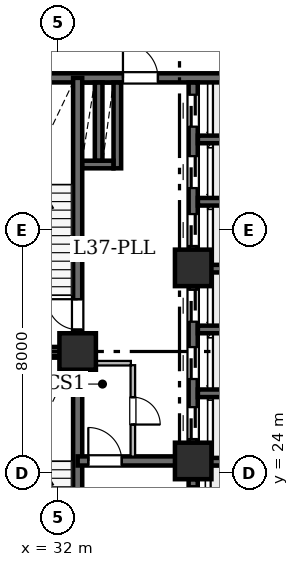
"""IFC4 building model, lengths in metres.
Left out: names, types, materials, properties, quantities, classifications, styles, units other than length and angle.
Written with IfcOpenShell. Run it as: python <this file> out.ifc"""

import sys

from ifc_helpers import new_model, si_unit, direction, frame, frame_2d, origin, origin_2d, place, context, subcontext, project, spatial, rectangle, hollow_rectangle, extrude, element, fill, save


model = new_model("IFC4")
c1 = context("Model", 3, precision=1e-05, world=origin(), true_north=direction((0.0, 1.0)))
c2 = subcontext(c1, "Body", "Model", "MODEL_VIEW")
j1 = project(units=[si_unit("LENGTHUNIT", "METRE"), si_unit("PLANEANGLEUNIT", "RADIAN")], contexts=[c1])
p1 = place(None, origin())
s1 = spatial("IfcSite", under=j1, at=p1, CompositionType="ELEMENT")
p2 = place(p1, origin())
s2 = spatial("IfcBuilding", under=s1, at=p2, CompositionType="ELEMENT")
p3 = place(p2, frame((0.0, 0.0, 145.7)))
s3 = spatial("IfcBuildingStorey", under=s2, at=p3, CompositionType="ELEMENT", Elevation=145.7)
for number, where, z_axis, x_axis in (
    (1, (32.65, 28.0, 0.0), (0.0, 0.0, 1.0), (1.0, 0.0, 0.0)),
    (2, (36.45, 24.4, 0.0), (0.0, 0.0, 1.0), (1.0, 0.0, 0.0)),
    (3, (36.45, 30.75, 0.0), (0.0, 0.0, 1.0), (1.0, 0.0, 0.0)),
):
    element("IfcColumn", number, at=place(p3, frame(where, z_axis=z_axis, x_axis=x_axis)), inside=s3, PredefinedType="COLUMN", context=c2, shape_type="SweptSolid", body=[
        extrude(hollow_rectangle(XDim=1.2, YDim=1.2, WallThickness=0.06, at=origin_2d()), origin(), (0.0, 0.0, 1.0), 4.8),
    ])
p4 = place(p3, frame((29.0, 37.0, 0.0), z_axis=(0.0, 0.0, 1.0), x_axis=(1.0, 0.0, 0.0)))
e4 = element("IfcWall", 4, at=p4, inside=s3, PredefinedType="SHEAR", context=c2, shape_type="SweptSolid", body=[
    extrude(rectangle(XDim=10.4, YDim=0.3, at=frame_2d((5.2, 0.0))), origin(), (0.0, 0.0, 1.0), 4.48),
])
p5 = place(p4, frame((5.14, 0.0, 0.0)))
e5 = element("IfcOpeningElement", 5, at=p5, cuts=e4, PredefinedType="OPENING", context=c2, shape_type="SweptSolid", body=[
    extrude(rectangle(XDim=1.15, YDim=2.2, at=frame_2d((0.575, 1.1))), frame((0.0, 0.16, 0.0), z_axis=(0.0, -1.0, 0.0), x_axis=(1.0, 0.0, 0.0)), (0.0, 0.0, 1.0), 0.32),
])
p6 = place(p3, frame((32.65, 19.0, 0.0), z_axis=(0.0, 0.0, 1.0), x_axis=(0.0, 1.0, 0.0)))
e6 = element("IfcWall", 6, at=p6, inside=s3, PredefinedType="SHEAR", context=c2, shape_type="SweptSolid", body=[
    extrude(rectangle(XDim=9.0, YDim=0.3, at=frame_2d((4.5, 0.0))), origin(), (0.0, 0.0, 1.0), 4.48),
])
p7 = place(p6, frame((0.72, 0.0, 0.0)))
e7 = element("IfcOpeningElement", 7, at=p7, cuts=e6, PredefinedType="OPENING", context=c2, shape_type="SweptSolid", body=[
    extrude(rectangle(XDim=1.0, YDim=2.15, at=frame_2d((0.5, 1.075))), frame((0.0, 0.16, 0.0), z_axis=(0.0, -1.0, 0.0), x_axis=(1.0, 0.0, 0.0)), (0.0, 0.0, 1.0), 0.32),
])
p8 = place(p3, frame((32.65, 28.0, 0.0), z_axis=(0.0, 0.0, 1.0), x_axis=(0.0, 1.0, 0.0)))
e8 = element("IfcWall", 8, at=p8, inside=s3, PredefinedType="SHEAR", context=c2, shape_type="SweptSolid", body=[
    extrude(rectangle(XDim=9.0, YDim=0.3, at=frame_2d((4.5, 0.0))), origin(), (0.0, 0.0, 1.0), 4.48),
])
p9 = place(p8, frame((0.72, 0.0, 0.0)))
e9 = element("IfcOpeningElement", 9, at=p9, cuts=e8, PredefinedType="OPENING", context=c2, shape_type="SweptSolid", body=[
    extrude(rectangle(XDim=1.0, YDim=2.15, at=frame_2d((0.5, 1.075))), frame((0.0, 0.16, 0.0), z_axis=(0.0, -1.0, 0.0), x_axis=(1.0, 0.0, 0.0)), (0.0, 0.0, 1.0), 0.32),
])
p10 = place(p3, frame((29.0, 28.0, 0.0), z_axis=(0.0, 0.0, 1.0), x_axis=(1.0, 0.0, 0.0)))
e10 = element("IfcWall", 10, at=p10, inside=s3, PredefinedType="SHEAR", context=c2, shape_type="SweptSolid", body=[
    extrude(rectangle(XDim=3.65, YDim=0.3, at=frame_2d((1.825, 0.0))), origin(), (0.0, 0.0, 1.0), 4.48),
])
p11 = place(p3, frame((32.65, 24.4, 0.0), z_axis=(0.0, 0.0, 1.0), x_axis=(1.0, 0.0, 0.0)))
e11 = element("IfcWall", 11, at=p11, inside=s3, PredefinedType="SHEAR", context=c2, shape_type="SweptSolid", body=[
    extrude(rectangle(XDim=3.8, YDim=0.3, at=frame_2d((1.9, 0.0))), origin(), (0.0, 0.0, 1.0), 4.48),
])
p12 = place(p11, frame((0.35, 0.0, 0.0)))
e12 = element("IfcOpeningElement", 12, at=p12, cuts=e11, PredefinedType="OPENING", context=c2, shape_type="SweptSolid", body=[
    extrude(rectangle(XDim=1.1, YDim=2.15, at=frame_2d((0.55, 1.075))), frame((0.0, 0.16, 0.0), z_axis=(0.0, -1.0, 0.0), x_axis=(1.0, 0.0, 0.0)), (0.0, 0.0, 1.0), 0.32),
])
p13 = place(p3, frame((36.45, 19.154, 0.0), z_axis=(0.0, 0.0, 1.0), x_axis=(0.0, 1.0, 0.0)))
e13 = element("IfcWall", 13, at=p13, inside=s3, PredefinedType="SHEAR", context=c2, shape_type="SweptSolid", body=[
    extrude(rectangle(XDim=4.646, YDim=0.3, at=frame_2d((2.323, 0.0))), origin(), (0.0, 0.0, 1.0), 4.48),
])
p14 = place(p13, frame((0.696, 0.0, 0.0)))
e14 = element("IfcOpeningElement", 14, at=p14, cuts=e13, PredefinedType="OPENING", context=c2, shape_type="SweptSolid", body=[
    extrude(rectangle(XDim=1.1, YDim=2.15, at=frame_2d((0.55, 1.075))), frame((0.0, 0.16, 0.0), z_axis=(0.0, -1.0, 0.0), x_axis=(1.0, 0.0, 0.0)), (0.0, 0.0, 1.0), 0.32),
])
p15 = place(p13, frame((3.316, 0.0, 0.0)))
e15 = element("IfcOpeningElement", 15, at=p15, cuts=e13, PredefinedType="OPENING", context=c2, shape_type="SweptSolid", body=[
    extrude(rectangle(XDim=1.1, YDim=2.15, at=frame_2d((0.55, 1.075))), frame((0.0, 0.16, 0.0), z_axis=(0.0, -1.0, 0.0), x_axis=(1.0, 0.0, 0.0)), (0.0, 0.0, 1.0), 0.32),
])
p16 = place(p3, frame((36.45, 25.0, 0.0), z_axis=(0.0, 0.0, 1.0), x_axis=(0.0, 1.0, 0.0)))
e16 = element("IfcWall", 16, at=p16, inside=s3, PredefinedType="SHEAR", context=c2, shape_type="SweptSolid", body=[
    extrude(rectangle(XDim=5.15, YDim=0.3, at=frame_2d((2.575, 0.0))), origin(), (0.0, 0.0, 1.0), 4.48),
])
p17 = place(p16, frame((0.12, 0.0, 0.0)))
e17 = element("IfcOpeningElement", 17, at=p17, cuts=e16, PredefinedType="OPENING", context=c2, shape_type="SweptSolid", body=[
    extrude(rectangle(XDim=1.05, YDim=2.15, at=frame_2d((0.525, 1.075))), frame((0.0, 0.16, 0.0), z_axis=(0.0, -1.0, 0.0), x_axis=(1.0, 0.0, 0.0)), (0.0, 0.0, 1.0), 0.32),
])
p18 = place(p16, frame((2.095, 0.0, 0.0)))
e18 = element("IfcOpeningElement", 18, at=p18, cuts=e16, PredefinedType="OPENING", context=c2, shape_type="SweptSolid", body=[
    extrude(rectangle(XDim=1.05, YDim=2.15, at=frame_2d((0.525, 1.075))), frame((0.0, 0.16, 0.0), z_axis=(0.0, -1.0, 0.0), x_axis=(1.0, 0.0, 0.0)), (0.0, 0.0, 1.0), 0.32),
])
p19 = place(p16, frame((3.98, 0.0, 0.0)))
e19 = element("IfcOpeningElement", 19, at=p19, cuts=e16, PredefinedType="OPENING", context=c2, shape_type="SweptSolid", body=[
    extrude(rectangle(XDim=1.05, YDim=2.15, at=frame_2d((0.525, 1.075))), frame((0.0, 0.16, 0.0), z_axis=(0.0, -1.0, 0.0), x_axis=(1.0, 0.0, 0.0)), (0.0, 0.0, 1.0), 0.32),
])
p20 = place(p3, frame((36.45, 31.35, 0.0), z_axis=(0.0, 0.0, 1.0), x_axis=(0.0, 1.0, 0.0)))
e20 = element("IfcWall", 20, at=p20, inside=s3, PredefinedType="SHEAR", context=c2, shape_type="SweptSolid", body=[
    extrude(rectangle(XDim=5.496, YDim=0.3, at=frame_2d((2.748, 0.0))), origin(), (0.0, 0.0, 1.0), 4.48),
])
p21 = place(p20, frame((0.12, 0.0, 0.0)))
e21 = element("IfcOpeningElement", 21, at=p21, cuts=e20, PredefinedType="OPENING", context=c2, shape_type="SweptSolid", body=[
    extrude(rectangle(XDim=1.05, YDim=2.15, at=frame_2d((0.525, 1.075))), frame((0.0, 0.16, 0.0), z_axis=(0.0, -1.0, 0.0), x_axis=(1.0, 0.0, 0.0)), (0.0, 0.0, 1.0), 0.32),
])
p22 = place(p20, frame((2.025, 0.0, 0.0)))
e22 = element("IfcOpeningElement", 22, at=p22, cuts=e20, PredefinedType="OPENING", context=c2, shape_type="SweptSolid", body=[
    extrude(rectangle(XDim=1.05, YDim=2.15, at=frame_2d((0.525, 1.075))), frame((0.0, 0.16, 0.0), z_axis=(0.0, -1.0, 0.0), x_axis=(1.0, 0.0, 0.0)), (0.0, 0.0, 1.0), 0.32),
])
p23 = place(p20, frame((4.045, 0.0, 0.0)))
e23 = element("IfcOpeningElement", 23, at=p23, cuts=e20, PredefinedType="OPENING", context=c2, shape_type="SweptSolid", body=[
    extrude(rectangle(XDim=1.05, YDim=2.15, at=frame_2d((0.525, 1.075))), frame((0.0, 0.16, 0.0), z_axis=(0.0, -1.0, 0.0), x_axis=(1.0, 0.0, 0.0)), (0.0, 0.0, 1.0), 0.32),
])
for number, where, z_axis, x_axis in (
    (24, (36.604, 24.375, 0.0), (0.0, 0.0, 1.0), (1.0, 0.0, 0.0)),
    (25, (36.604, 26.625, 0.0), (0.0, 0.0, 1.0), (1.0, 0.0, 0.0)),
    (26, (36.604, 28.725, 0.0), (0.0, 0.0, 1.0), (1.0, 0.0, 0.0)),
    (27, (36.604, 30.725, 0.0), (0.0, 0.0, 1.0), (1.0, 0.0, 0.0)),
    (28, (36.604, 32.925, 0.0), (0.0, 0.0, 1.0), (1.0, 0.0, 0.0)),
    (29, (36.604, 34.975, 0.0), (0.0, 0.0, 1.0), (1.0, 0.0, 0.0)),
):
    element("IfcWall", number, at=place(p3, frame(where, z_axis=z_axis, x_axis=x_axis)), inside=s3, PredefinedType="SHEAR", context=c2, shape_type="SweptSolid", body=[
        extrude(rectangle(XDim=2.642, YDim=0.25, at=frame_2d((1.321, 0.0))), origin(), (0.0, 0.0, 1.0), 4.48),
    ])
p24 = place(p3, frame((33.955, 34.025, 0.0), z_axis=(0.0, 0.0, 1.0), x_axis=(0.0, 1.0, 0.0)))
e30 = element("IfcWall", 30, at=p24, inside=s3, PredefinedType="SHEAR", context=c2, shape_type="SweptSolid", body=[
    extrude(rectangle(XDim=2.821, YDim=0.25, at=frame_2d((1.411, 0.0))), origin(), (0.0, 0.0, 1.0), 4.48),
])
p25 = place(p3, frame((32.804, 34.15, 0.0), z_axis=(0.0, 0.0, 1.0), x_axis=(1.0, 0.0, 0.0)))
e31 = element("IfcWall", 31, at=p25, inside=s3, PredefinedType="SHEAR", context=c2, shape_type="SweptSolid", body=[
    extrude(rectangle(XDim=1.022, YDim=0.25, at=frame_2d((0.511, 0.0))), origin(), (0.0, 0.0, 1.0), 4.48),
])
p26 = place(p3, frame((33.34, 34.279, 0.0), z_axis=(0.0, 0.0, 1.0), x_axis=(0.0, 1.0, 0.0)))
e32 = element("IfcWall", 32, at=p26, inside=s3, PredefinedType="SHEAR", context=c2, shape_type="SweptSolid", body=[
    extrude(rectangle(XDim=2.567, YDim=0.25, at=frame_2d((1.283, 0.0))), origin(), (0.0, 0.0, 1.0), 4.48),
])
p27 = place(p3, frame((32.794, 27.615, 0.0), z_axis=(0.0, 0.0, 1.0), x_axis=(1.0, 0.0, 0.0)))
e33 = element("IfcWall", 33, at=p27, inside=s3, PredefinedType="STANDARD", context=c2, shape_type="SweptSolid", body=[
    extrude(rectangle(XDim=1.606, YDim=0.15, at=frame_2d((0.803, 0.0))), origin(), (0.0, 0.0, 1.0), 3.937),
])
p28 = place(p3, frame((34.465, 27.55, 0.0), z_axis=(0.0, 0.0, 1.0), x_axis=(0.0, -1.0, 0.0)))
e34 = element("IfcWall", 34, at=p28, inside=s3, PredefinedType="STANDARD", context=c2, shape_type="SweptSolid", body=[
    extrude(rectangle(XDim=3.006, YDim=0.15, at=frame_2d((1.503, 0.0))), origin(), (0.0, 0.0, 1.0), 4.48),
])
p29 = place(p28, frame((1.053, 0.0, 0.0)))
e35 = element("IfcOpeningElement", 35, at=p29, cuts=e34, PredefinedType="OPENING", context=c2, shape_type="SweptSolid", body=[
    extrude(rectangle(XDim=0.9, YDim=2.1, at=frame_2d((0.45, 1.05))), frame((0.0, 0.085, 0.0), z_axis=(0.0, -1.0, 0.0), x_axis=(1.0, 0.0, 0.0)), (0.0, 0.0, 1.0), 0.17),
])
p30 = place(p9, origin())
e36 = element("IfcDoor", 36, at=p30, inside=s3, OperationType="SINGLE_SWING_RIGHT", PredefinedType="DOOR", context=c2, shape_type="SweptSolid", body=[
    extrude(rectangle(XDim=1.0, YDim=2.15, at=frame_2d((0.5, 1.075))), frame((0.0, 0.025, 0.0), z_axis=(0.0, -1.0, 0.0), x_axis=(1.0, 0.0, 0.0)), (0.0, 0.0, 1.0), 0.05),
])
fill(e9, e36)
p31 = place(p12, origin())
e37 = element("IfcDoor", 37, at=p31, inside=s3, OperationType="SINGLE_SWING_LEFT", PredefinedType="DOOR", context=c2, shape_type="SweptSolid", body=[
    extrude(rectangle(XDim=1.1, YDim=2.15, at=frame_2d((0.55, 1.075))), frame((0.0, 0.025, 0.0), z_axis=(0.0, -1.0, 0.0), x_axis=(1.0, 0.0, 0.0)), (0.0, 0.0, 1.0), 0.05),
])
fill(e12, e37)
p32 = place(p5, origin())
e38 = element("IfcDoor", 38, at=p32, inside=s3, OperationType="SINGLE_SWING_LEFT", PredefinedType="DOOR", context=c2, shape_type="SweptSolid", body=[
    extrude(rectangle(XDim=1.15, YDim=2.2, at=frame_2d((0.575, 1.1))), frame((0.0, 0.025, 0.0), z_axis=(0.0, -1.0, 0.0), x_axis=(1.0, 0.0, 0.0)), (0.0, 0.0, 1.0), 0.05),
])
fill(e5, e38)
p33 = place(p15, origin())
e39 = element("IfcDoor", 39, at=p33, inside=s3, OperationType="SLIDING_TO_LEFT", PredefinedType="DOOR", context=c2, shape_type="SweptSolid", body=[
    extrude(rectangle(XDim=1.1, YDim=2.15, at=frame_2d((0.55, 1.075))), frame((0.0, 0.025, 0.0), z_axis=(0.0, -1.0, 0.0), x_axis=(1.0, 0.0, 0.0)), (0.0, 0.0, 1.0), 0.05),
])
fill(e15, e39)
p34 = place(p17, origin())
e40 = element("IfcDoor", 40, at=p34, inside=s3, OperationType="SLIDING_TO_LEFT", PredefinedType="DOOR", context=c2, shape_type="SweptSolid", body=[
    extrude(rectangle(XDim=1.05, YDim=2.15, at=frame_2d((0.525, 1.075))), frame((0.0, 0.025, 0.0), z_axis=(0.0, -1.0, 0.0), x_axis=(1.0, 0.0, 0.0)), (0.0, 0.0, 1.0), 0.05),
])
fill(e17, e40)
p35 = place(p18, origin())
e41 = element("IfcDoor", 41, at=p35, inside=s3, OperationType="SLIDING_TO_LEFT", PredefinedType="DOOR", context=c2, shape_type="SweptSolid", body=[
    extrude(rectangle(XDim=1.05, YDim=2.15, at=frame_2d((0.525, 1.075))), frame((0.0, 0.025, 0.0), z_axis=(0.0, -1.0, 0.0), x_axis=(1.0, 0.0, 0.0)), (0.0, 0.0, 1.0), 0.05),
])
fill(e18, e41)
p36 = place(p19, origin())
e42 = element("IfcDoor", 42, at=p36, inside=s3, OperationType="SLIDING_TO_LEFT", PredefinedType="DOOR", context=c2, shape_type="SweptSolid", body=[
    extrude(rectangle(XDim=1.05, YDim=2.15, at=frame_2d((0.525, 1.075))), frame((0.0, 0.025, 0.0), z_axis=(0.0, -1.0, 0.0), x_axis=(1.0, 0.0, 0.0)), (0.0, 0.0, 1.0), 0.05),
])
fill(e19, e42)
p37 = place(p21, origin())
e43 = element("IfcDoor", 43, at=p37, inside=s3, OperationType="SLIDING_TO_LEFT", PredefinedType="DOOR", context=c2, shape_type="SweptSolid", body=[
    extrude(rectangle(XDim=1.05, YDim=2.15, at=frame_2d((0.525, 1.075))), frame((0.0, 0.025, 0.0), z_axis=(0.0, -1.0, 0.0), x_axis=(1.0, 0.0, 0.0)), (0.0, 0.0, 1.0), 0.05),
])
fill(e21, e43)
p38 = place(p22, origin())
e44 = element("IfcDoor", 44, at=p38, inside=s3, OperationType="SLIDING_TO_LEFT", PredefinedType="DOOR", context=c2, shape_type="SweptSolid", body=[
    extrude(rectangle(XDim=1.05, YDim=2.15, at=frame_2d((0.525, 1.075))), frame((0.0, 0.025, 0.0), z_axis=(0.0, -1.0, 0.0), x_axis=(1.0, 0.0, 0.0)), (0.0, 0.0, 1.0), 0.05),
])
fill(e22, e44)
p39 = place(p23, origin())
e45 = element("IfcDoor", 45, at=p39, inside=s3, OperationType="SLIDING_TO_LEFT", PredefinedType="DOOR", context=c2, shape_type="SweptSolid", body=[
    extrude(rectangle(XDim=1.05, YDim=2.15, at=frame_2d((0.525, 1.075))), frame((0.0, 0.025, 0.0), z_axis=(0.0, -1.0, 0.0), x_axis=(1.0, 0.0, 0.0)), (0.0, 0.0, 1.0), 0.05),
])
fill(e23, e45)
p40 = place(p29, origin())
e46 = element("IfcDoor", 46, at=p40, inside=s3, OperationType="SINGLE_SWING_RIGHT", PredefinedType="DOOR", context=c2, shape_type="SweptSolid", body=[
    extrude(rectangle(XDim=0.9, YDim=2.1, at=frame_2d((0.45, 1.05))), frame((0.0, 0.025, 0.0), z_axis=(0.0, -1.0, 0.0), x_axis=(1.0, 0.0, 0.0)), (0.0, 0.0, 1.0), 0.05),
])
fill(e35, e46)
save(model, sys.argv[1])
